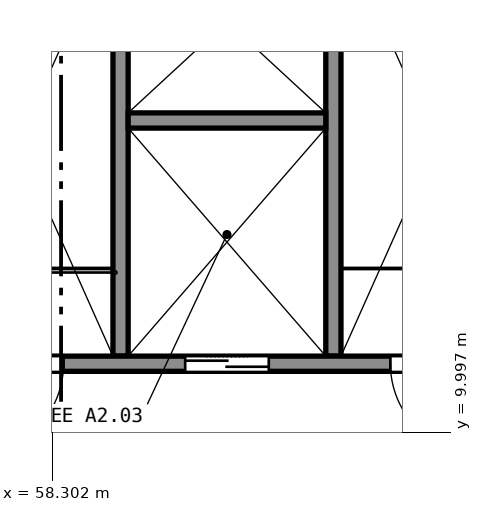
"""IFC4 building model, lengths in metres.
Left out: names, types, materials, properties, quantities, classifications, styles, units other than length and angle.
Written with IfcOpenShell. Run it as: python <this file> out.ifc"""

import sys

from ifc_helpers import new_model, si_unit, direction, frame, frame_2d, origin, place, context, subcontext, project, spatial, polyline, rectangle, outline, extrude, element, fill, save


model = new_model("IFC4")
c1 = context("Model", 3, precision=1e-05, world=origin(), true_north=direction((0.0, 1.0)))
c2 = subcontext(c1, "Body", "Model", "MODEL_VIEW")
j1 = project(units=[si_unit("LENGTHUNIT", "METRE"), si_unit("PLANEANGLEUNIT", "RADIAN")], contexts=[c1])
p1 = place(None, origin())
s1 = spatial("IfcSite", under=j1, at=p1, CompositionType="ELEMENT")
p2 = place(p1, origin())
s2 = spatial("IfcBuilding", under=s1, at=p2, CompositionType="ELEMENT")
p3 = place(p2, frame((0.0, 0.0, 25.0)))
s3 = spatial("IfcBuildingStorey", under=s2, at=p3, CompositionType="ELEMENT", Elevation=25.0)
p4 = place(p3, frame((56.6, 10.9, 0.0), z_axis=(0.0, 0.0, 1.0), x_axis=(1.0, 0.0, 0.0)))
e1 = element("IfcWall", 1, at=p4, inside=s3, PredefinedType="SHEAR", context=c2, shape_type="SweptSolid", body=[
    extrude(rectangle(XDim=8.0, YDim=0.2, at=frame_2d((4.0, 0.0))), origin(), (0.0, 0.0, 1.0), 6.317),
])
p5 = place(p4, frame((0.65, 0.0, 0.0)))
e2 = element("IfcOpeningElement", 2, at=p5, cuts=e1, PredefinedType="OPENING", context=c2, shape_type="SweptSolid", body=[
    extrude(rectangle(XDim=1.2, YDim=2.1, at=frame_2d((0.6, 1.05))), frame((0.0, 0.11, 0.0), z_axis=(0.0, -1.0, 0.0), x_axis=(1.0, 0.0, 0.0)), (0.0, 0.0, 1.0), 0.22),
])
p6 = place(p4, frame((6.15, 0.0, 0.0)))
e3 = element("IfcOpeningElement", 3, at=p6, cuts=e1, PredefinedType="OPENING", context=c2, shape_type="SweptSolid", body=[
    extrude(rectangle(XDim=1.2, YDim=2.1, at=frame_2d((0.6, 1.05))), frame((0.0, 0.11, 0.0), z_axis=(0.0, -1.0, 0.0), x_axis=(1.0, 0.0, 0.0)), (0.0, 0.0, 1.0), 0.22),
])
p7 = place(p4, frame((3.45, 0.0, 0.0)))
e4 = element("IfcOpeningElement", 4, at=p7, cuts=e1, PredefinedType="OPENING", context=c2, shape_type="SweptSolid", body=[
    extrude(rectangle(XDim=1.1, YDim=2.1, at=frame_2d((0.55, 1.05))), frame((0.0, 0.11, 0.0), z_axis=(0.0, -1.0, 0.0), x_axis=(1.0, 0.0, 0.0)), (0.0, 0.0, 1.0), 0.22),
])
for number, where, z_axis, x_axis in (
    (5, (59.2, 11.0, 0.0), (0.0, 0.0, 1.0), (0.0, 1.0, 0.0)),
    (6, (62.0, 11.0, 0.0), (0.0, 0.0, 1.0), (0.0, 1.0, 0.0)),
):
    element("IfcWall", number, at=place(p3, frame(where, z_axis=z_axis, x_axis=x_axis)), inside=s3, PredefinedType="SHEAR", context=c2, shape_type="SweptSolid", body=[
        extrude(outline(polyline([(0.0, 0.0), (5.6, 0.0), (5.6, 4.465), (5.01, 4.657), (4.716, 4.752), (3.832, 5.04), (3.537, 5.135), (2.653, 5.423), (2.358, 5.518), (1.474, 5.806), (1.179, 5.901), (0.0, 6.285), (0.0, 0.0)])), frame((0.0, 0.1, 0.0), z_axis=(0.0, -1.0, 0.0), x_axis=(1.0, 0.0, 0.0)), (0.0, 0.0, 1.0), 0.2),
    ])
p8 = place(p3, frame((59.3, 14.1, 0.0), z_axis=(0.0, 0.0, 1.0), x_axis=(1.0, 0.0, 0.0)))
e7 = element("IfcWall", 7, at=p8, inside=s3, PredefinedType="SHEAR", context=c2, shape_type="SweptSolid", body=[
    extrude(rectangle(XDim=2.6, YDim=0.2, at=frame_2d((1.3, 0.0))), origin(), (0.0, 0.0, 1.0), 5.278),
])
p9 = place(p5, origin())
e8 = element("IfcDoor", 8, at=p9, inside=s3, OperationType="SINGLE_SWING_LEFT", PredefinedType="DOOR", context=c2, shape_type="SweptSolid", body=[
    extrude(rectangle(XDim=1.2, YDim=2.1, at=frame_2d((0.6, 1.05))), frame((0.0, 0.025, 0.0), z_axis=(0.0, -1.0, 0.0), x_axis=(1.0, 0.0, 0.0)), (0.0, 0.0, 1.0), 0.05),
])
fill(e2, e8)
p10 = place(p6, origin())
e9 = element("IfcDoor", 9, at=p10, inside=s3, OperationType="SINGLE_SWING_RIGHT", PredefinedType="DOOR", context=c2, shape_type="SweptSolid", body=[
    extrude(rectangle(XDim=1.2, YDim=2.1, at=frame_2d((0.6, 1.05))), frame((0.0, 0.025, 0.0), z_axis=(0.0, -1.0, 0.0), x_axis=(1.0, 0.0, 0.0)), (0.0, 0.0, 1.0), 0.05),
])
fill(e3, e9)
p11 = place(p7, origin())
e10 = element("IfcDoor", 10, at=p11, inside=s3, OperationType="DOUBLE_DOOR_SLIDING", PredefinedType="DOOR", context=c2, shape_type="SweptSolid", body=[
    extrude(rectangle(XDim=1.1, YDim=2.1, at=frame_2d((0.55, 1.05))), frame((0.0, 0.025, 0.0), z_axis=(0.0, -1.0, 0.0), x_axis=(1.0, 0.0, 0.0)), (0.0, 0.0, 1.0), 0.05),
])
fill(e4, e10)
save(model, sys.argv[1])
